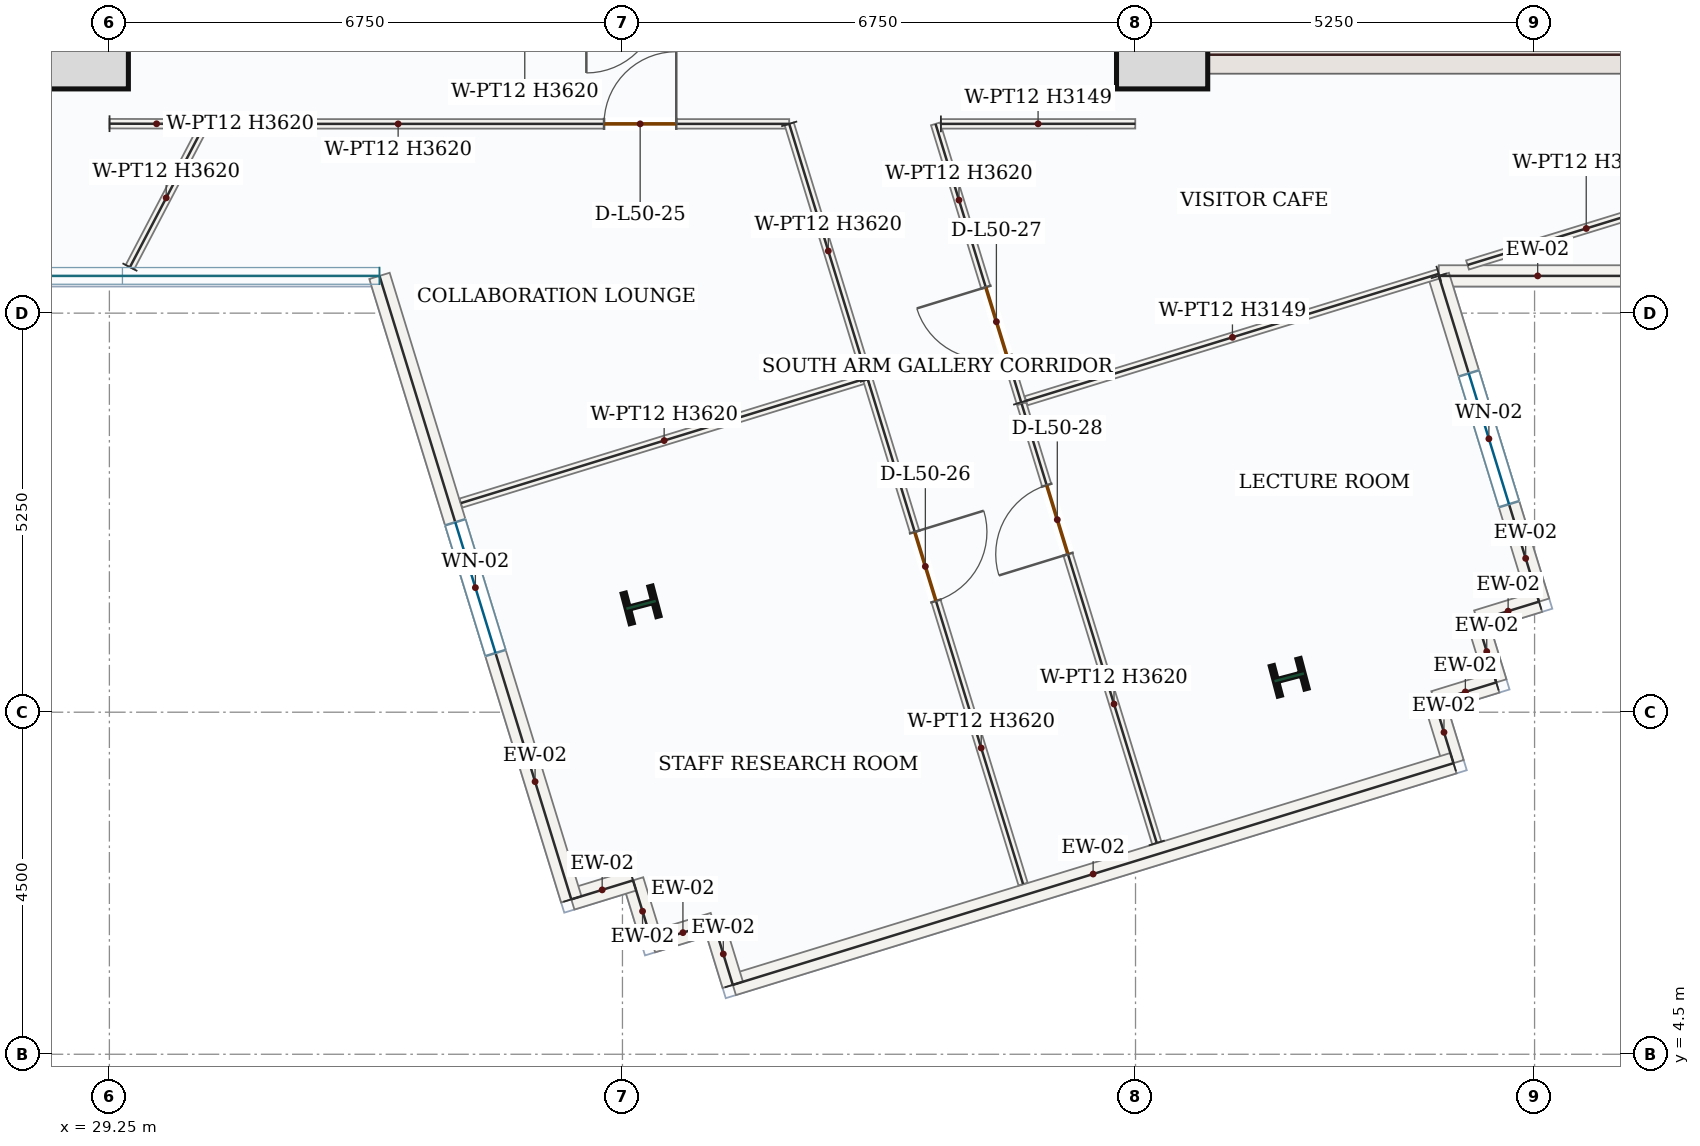
"""IFC4 building model, lengths in metres.
Left out: names, types, materials, properties, quantities, classifications, styles, units other than length and angle.
Written with IfcOpenShell. Run it as: python <this file> out.ifc"""

import sys

from ifc_helpers import new_model, si_unit, direction, frame, frame_2d, origin, origin_2d, place, context, subcontext, project, spatial, rectangle, i_section, extrude, source, transform, mapped, element, fill, save


model = new_model("IFC4")
c1 = context("Model", 3, precision=1e-05, world=origin(), true_north=direction((0.0, 1.0)))
c2 = subcontext(c1, "Body", "Model", "MODEL_VIEW")
j1 = project(units=[si_unit("LENGTHUNIT", "METRE"), si_unit("PLANEANGLEUNIT", "RADIAN")], contexts=[c1])
p1 = place(None, origin())
s1 = spatial("IfcSite", under=j1, at=p1, CompositionType="ELEMENT")
p2 = place(p1, origin())
s2 = spatial("IfcBuilding", under=s1, at=p2, CompositionType="ELEMENT")
p3 = place(p2, frame((0.0, 0.0, 213.6)))
s3 = spatial("IfcBuildingStorey", under=s2, at=p3, CompositionType="ELEMENT", Elevation=213.6)
p4 = place(p3, frame((29.0, 17.4, 0.0), z_axis=(0.0, 0.0, 1.0), x_axis=(0.0, 1.0, 0.0)))
e1 = element("IfcWall", 1, at=p4, inside=s3, PredefinedType="SHEAR", context=c2, shape_type="SweptSolid", body=[
    extrude(rectangle(XDim=8.55, YDim=0.5, at=frame_2d((4.275, 0.0))), origin(), (0.0, 0.0, 1.0), 3.62),
])
p5 = place(p4, frame((6.65, 0.0, 0.0)))
e2 = element("IfcOpeningElement", 2, at=p5, cuts=e1, PredefinedType="OPENING", context=c2, shape_type="SweptSolid", body=[
    extrude(rectangle(XDim=1.1, YDim=2.2, at=frame_2d((0.55, 1.1))), frame((0.0, 0.26, 0.0), z_axis=(0.0, -1.0, 0.0), x_axis=(1.0, 0.0, 0.0)), (0.0, 0.0, 1.0), 0.52),
])
p6 = place(p4, frame((3.15, 0.0, 0.0)))
e3 = element("IfcOpeningElement", 3, at=p6, cuts=e1, PredefinedType="OPENING", context=c2, shape_type="SweptSolid", body=[
    extrude(rectangle(XDim=0.88, YDim=2.1, at=frame_2d((0.44, 1.05))), frame((0.0, 0.26, 0.0), z_axis=(0.0, -1.0, 0.0), x_axis=(1.0, 0.0, 0.0)), (0.0, 0.0, 1.0), 0.52),
])
m1 = source(origin(), c2, "Body", "SweptSolid", [
    extrude(rectangle(XDim=7.0, YDim=0.5, at=frame_2d((3.5, 0.0))), origin(), (0.0, 0.0, 1.0), 3.62),
])
p7 = place(p3, frame((21.75, 17.65, 0.0), z_axis=(0.0, 0.0, 1.0), x_axis=(1.0, 0.0, 0.0)))
e4 = element("IfcWall", 4, at=p7, inside=s3, PredefinedType="SHEAR", context=c2, shape_type="MappedRepresentation", body=[
    mapped(m1, transform((0.0, 0.0, 0.0), x_axis=(1.0, 0.0, 0.0), y_axis=(0.0, 1.0, 0.0), z_axis=(0.0, 0.0, 1.0), scale=1.0)),
])
p8 = place(p3, frame((43.0, 17.4, 0.0), z_axis=(0.0, 0.0, 1.0), x_axis=(0.0, 1.0, 0.0)))
e5 = element("IfcWall", 5, at=p8, inside=s3, PredefinedType="SHEAR", context=c2, shape_type="SweptSolid", body=[
    extrude(rectangle(XDim=8.55, YDim=0.5, at=frame_2d((4.275, 0.0))), origin(), (0.0, 0.0, 1.0), 3.62),
])
p9 = place(p8, frame((6.65, 0.0, 0.0)))
e6 = element("IfcOpeningElement", 6, at=p9, cuts=e5, PredefinedType="OPENING", context=c2, shape_type="SweptSolid", body=[
    extrude(rectangle(XDim=1.1, YDim=2.2, at=frame_2d((0.55, 1.1))), frame((0.0, 0.26, 0.0), z_axis=(0.0, -1.0, 0.0), x_axis=(1.0, 0.0, 0.0)), (0.0, 0.0, 1.0), 0.52),
])
p10 = place(p8, frame((1.75, 0.0, 0.0)))
e7 = element("IfcOpeningElement", 7, at=p10, cuts=e5, PredefinedType="OPENING", context=c2, shape_type="SweptSolid", body=[
    extrude(rectangle(XDim=1.3, YDim=2.2, at=frame_2d((0.65, 1.1))), frame((0.0, 0.26, 0.0), z_axis=(0.0, -1.0, 0.0), x_axis=(1.0, 0.0, 0.0)), (0.0, 0.0, 1.0), 0.52),
])
p11 = place(p8, frame((4.55, 0.0, 0.0)))
e8 = element("IfcOpeningElement", 8, at=p11, cuts=e5, PredefinedType="OPENING", context=c2, shape_type="SweptSolid", body=[
    extrude(rectangle(XDim=0.88, YDim=2.1, at=frame_2d((0.44, 1.05))), frame((0.0, 0.26, 0.0), z_axis=(0.0, -1.0, 0.0), x_axis=(1.0, 0.0, 0.0)), (0.0, 0.0, 1.0), 0.52),
])
p12 = place(p3, frame((43.25, 17.65, 0.0), z_axis=(0.0, 0.0, 1.0), x_axis=(1.0, 0.0, 0.0)))
e9 = element("IfcWall", 9, at=p12, inside=s3, PredefinedType="SHEAR", context=c2, shape_type="MappedRepresentation", body=[
    mapped(m1, transform((0.0, 0.0, 0.0), x_axis=(1.0, 0.0, 0.0), y_axis=(0.0, 1.0, 0.0), z_axis=(0.0, 0.0, 1.0), scale=1.0)),
])
m2 = source(origin(), c2, "Body", "SweptSolid", [
    extrude(rectangle(XDim=1.2, YDim=1.2, at=origin_2d()), origin(), (0.0, 0.0, 1.0), 3.9),
])
for number, where, z_axis, x_axis in (
    (10, (28.9, 17.8, 0.0), (0.0, 0.0, 1.0), (1.0, 0.0, 0.0)),
    (11, (43.1, 17.8, 0.0), (0.0, 0.0, 1.0), (1.0, 0.0, 0.0)),
):
    element("IfcColumn", number, at=place(p3, frame(where, z_axis=z_axis, x_axis=x_axis)), inside=s3, PredefinedType="COLUMN", context=c2, shape_type="MappedRepresentation", body=[
        mapped(m2, transform((0.0, 0.0, 0.0), x_axis=(1.0, 0.0, 0.0), y_axis=(0.0, 1.0, 0.0), z_axis=(0.0, 0.0, 1.0), scale=1.0)),
    ])
m3 = source(origin(), c2, "Body", "SweptSolid", [
    extrude(i_section(OverallWidth=0.404, OverallDepth=0.407, WebThickness=0.027, FlangeThickness=0.044, FilletRadius=0.018, at=origin_2d()), origin(), (0.0, 0.0, 1.0), 3.9),
])
for number, where, z_axis, x_axis in (
    (12, (36.245, 10.412, 0.0), (0.0, 0.0, 1.0), (-0.255, 0.967, 0.0)),
    (13, (44.772, 9.459, 0.0), (0.0, 0.0, 1.0), (-0.255, 0.967, 0.0)),
):
    element("IfcColumn", number, at=place(p3, frame(where, z_axis=z_axis, x_axis=x_axis)), inside=s3, PredefinedType="COLUMN", context=c2, shape_type="MappedRepresentation", body=[
        mapped(m3, transform((0.0, 0.0, 0.0), x_axis=(1.0, 0.0, 0.0), y_axis=(0.0, 1.0, 0.0), z_axis=(0.0, 0.0, 1.0), scale=1.0)),
    ])
m4 = source(origin(), c2, "Body", "SweptSolid", [
    extrude(rectangle(XDim=2.602, YDim=0.28, at=frame_2d((1.301, 0.0))), origin(), (0.0, 0.0, 1.0), 3.62),
])
p13 = place(p3, frame((49.342, 14.74, 0.0), z_axis=(0.0, 0.0, 1.0), x_axis=(-1.0, 0.0, 0.0)))
e14 = element("IfcWall", 14, at=p13, inside=s3, PredefinedType="SOLIDWALL", context=c2, shape_type="MappedRepresentation", body=[
    mapped(m4, transform((0.0, 0.0, 0.0), x_axis=(1.0, 0.0, 0.0), y_axis=(0.0, 1.0, 0.0), z_axis=(0.0, 0.0, 1.0), scale=1.0)),
])
p14 = place(p3, frame((46.74, 14.74, 0.0), z_axis=(0.0, 0.0, 1.0), x_axis=(0.294009328951, -0.95580254995, 0.0)))
e15 = element("IfcWall", 15, at=p14, inside=s3, PredefinedType="SOLIDWALL", context=c2, shape_type="SweptSolid", body=[
    extrude(rectangle(XDim=4.484, YDim=0.28, at=frame_2d((2.242, 0.0))), origin(), (0.0, 0.0, 1.0), 3.62),
])
p15 = place(p14, frame((1.342, 0.0, 0.85)))
e16 = element("IfcOpeningElement", 16, at=p15, cuts=e15, PredefinedType="OPENING", context=c2, shape_type="SweptSolid", body=[
    extrude(rectangle(XDim=1.8, YDim=1.75, at=frame_2d((0.9, 0.875))), frame((0.0, 0.15, 0.0), z_axis=(0.0, -1.0, 0.0), x_axis=(1.0, 0.0, 0.0)), (0.0, 0.0, 1.0), 0.3),
])
m5 = source(origin(), c2, "Body", "SweptSolid", [
    extrude(rectangle(XDim=0.85, YDim=0.28, at=frame_2d((0.425, 0.0))), origin(), (0.0, 0.0, 1.0), 3.62),
])
p16 = place(p3, frame((48.058, 10.454, 0.0), z_axis=(0.0, 0.0, 1.0), x_axis=(-0.955834897765, -0.293904148005, 0.0)))
e17 = element("IfcWall", 17, at=p16, inside=s3, PredefinedType="SOLIDWALL", context=c2, shape_type="MappedRepresentation", body=[
    mapped(m5, transform((0.0, 0.0, 0.0), x_axis=(1.0, 0.0, 0.0), y_axis=(0.0, 1.0, 0.0), z_axis=(0.0, 0.0, 1.0), scale=1.0)),
])
m6 = source(origin(), c2, "Body", "SweptSolid", [
    extrude(rectangle(XDim=0.85, YDim=0.28, at=frame_2d((0.425, 0.0))), origin(), (0.0, 0.0, 1.0), 3.62),
])
p17 = place(p3, frame((47.246, 10.204, 0.0), z_axis=(0.0, 0.0, 1.0), x_axis=(0.293823460726, -0.955859704102, 0.0)))
e18 = element("IfcWall", 18, at=p17, inside=s3, PredefinedType="SOLIDWALL", context=c2, shape_type="MappedRepresentation", body=[
    mapped(m6, transform((0.0, 0.0, 0.0), x_axis=(1.0, 0.0, 0.0), y_axis=(0.0, 1.0, 0.0), z_axis=(0.0, 0.0, 1.0), scale=1.0)),
])
p18 = place(p3, frame((47.496, 9.392, 0.0), z_axis=(0.0, 0.0, 1.0), x_axis=(-0.95575416016, -0.294166594531, 0.0)))
e19 = element("IfcWall", 19, at=p18, inside=s3, PredefinedType="SOLIDWALL", context=c2, shape_type="MappedRepresentation", body=[
    mapped(m5, transform((0.0, 0.0, 0.0), x_axis=(1.0, 0.0, 0.0), y_axis=(0.0, 1.0, 0.0), z_axis=(0.0, 0.0, 1.0), scale=1.0)),
])
p19 = place(p3, frame((46.683, 9.142, 0.0), z_axis=(0.0, 0.0, 1.0), x_axis=(0.293823460726, -0.955859704102, 0.0)))
e20 = element("IfcWall", 20, at=p19, inside=s3, PredefinedType="SOLIDWALL", context=c2, shape_type="MappedRepresentation", body=[
    mapped(m6, transform((0.0, 0.0, 0.0), x_axis=(1.0, 0.0, 0.0), y_axis=(0.0, 1.0, 0.0), z_axis=(0.0, 0.0, 1.0), scale=1.0)),
])
m7 = source(origin(), c2, "Body", "SweptSolid", [
    extrude(rectangle(XDim=9.92, YDim=0.28, at=frame_2d((4.96, 0.0))), origin(), (0.0, 0.0, 1.0), 3.62),
])
p20 = place(p3, frame((46.933, 8.329, 0.0), z_axis=(0.0, 0.0, 1.0), x_axis=(-0.955796567368, -0.294028777175, 0.0)))
e21 = element("IfcWall", 21, at=p20, inside=s3, PredefinedType="SOLIDWALL", context=c2, shape_type="MappedRepresentation", body=[
    mapped(m7, transform((0.0, 0.0, 0.0), x_axis=(1.0, 0.0, 0.0), y_axis=(0.0, 1.0, 0.0), z_axis=(0.0, 0.0, 1.0), scale=1.0)),
])
for number, where, z_axis, x_axis in (
    (22, (37.452, 5.413, 0.0), (0.0, 0.0, 1.0), (-0.294, 0.956, 0.0)),
    (23, (37.202, 6.225, 0.0), (0.0, 0.0, 1.0), (-0.956, -0.294, 0.0)),
    (24, (36.389, 5.975, 0.0), (0.0, 0.0, 1.0), (-0.294, 0.956, 0.0)),
    (25, (36.139, 6.788, 0.0), (0.0, 0.0, 1.0), (-0.956, -0.294, 0.0)),
):
    element("IfcWall", number, at=place(p3, frame(where, z_axis=z_axis, x_axis=x_axis)), inside=s3, PredefinedType="SOLIDWALL", context=c2, shape_type="MappedRepresentation", body=[
        mapped(m6, transform((0.0, 0.0, 0.0), x_axis=(1.0, 0.0, 0.0), y_axis=(0.0, 1.0, 0.0), z_axis=(0.0, 0.0, 1.0), scale=1.0)),
    ])
p21 = place(p3, frame((35.327, 6.538, 0.0), z_axis=(0.0, 0.0, 1.0), x_axis=(-0.294019877333, 0.955799305154, 0.0)))
e26 = element("IfcWall", 26, at=p21, inside=s3, PredefinedType="SOLIDWALL", context=c2, shape_type="SweptSolid", body=[
    extrude(rectangle(XDim=8.582, YDim=0.28, at=frame_2d((4.291, 0.0))), origin(), (0.0, 0.0, 1.0), 3.62),
])
p22 = place(p21, frame((3.391, 0.0, 0.85)))
e27 = element("IfcOpeningElement", 27, at=p22, cuts=e26, PredefinedType="OPENING", context=c2, shape_type="SweptSolid", body=[
    extrude(rectangle(XDim=1.8, YDim=1.75, at=frame_2d((0.9, 0.875))), frame((0.0, 0.15, 0.0), z_axis=(0.0, -1.0, 0.0), x_axis=(1.0, 0.0, 0.0)), (0.0, 0.0, 1.0), 0.3),
])
p23 = place(p3, frame((41.246, 13.077, 0.0), z_axis=(0.0, 0.0, 1.0), x_axis=(-0.294050037582, 0.955790026836, 0.0)))
e28 = element("IfcWall", 28, at=p23, inside=s3, PredefinedType="PARTITIONING", context=c2, shape_type="SweptSolid", body=[
    extrude(rectangle(XDim=3.833, YDim=0.125, at=frame_2d((1.916, 0.0))), origin(), (0.0, 0.0, 1.0), 3.62),
])
p24 = place(p23, frame((0.634, 0.0, 0.0)))
e29 = element("IfcOpeningElement", 29, at=p24, cuts=e28, PredefinedType="OPENING", context=c2, shape_type="SweptSolid", body=[
    extrude(rectangle(XDim=0.95, YDim=2.15, at=frame_2d((0.475, 1.075))), frame((0.0, 0.073, 0.0), z_axis=(0.0, -1.0, 0.0), x_axis=(1.0, 0.0, 0.0)), (0.0, 0.0, 1.0), 0.145),
])
m8 = source(origin(), c2, "Body", "SweptSolid", [
    extrude(rectangle(XDim=2.557, YDim=0.125, at=frame_2d((1.278, 0.0))), origin(), (0.0, 0.0, 1.0), 3.149),
])
p25 = place(p3, frame((40.19, 16.74, 0.0), z_axis=(0.0, 0.0, 1.0), x_axis=(0.999999886036, 0.000477418068, 0.0)))
e30 = element("IfcWall", 30, at=p25, inside=s3, PredefinedType="PARTITIONING", context=c2, shape_type="MappedRepresentation", body=[
    mapped(m8, transform((0.0, 0.0, 0.0), x_axis=(1.0, 0.0, 0.0), y_axis=(0.0, 1.0, 0.0), z_axis=(0.0, 0.0, 1.0), scale=1.0)),
])
m9 = source(origin(), c2, "Body", "SweptSolid", [
    extrude(rectangle(XDim=3.268, YDim=0.125, at=frame_2d((1.634, 0.0))), origin(), (0.0, 0.0, 1.0), 3.62),
])
p26 = place(p3, frame((50.241, 15.844, 0.0), z_axis=(0.0, 0.0, 1.0), x_axis=(-0.955791929964, -0.294043851519, 0.0)))
e31 = element("IfcWall", 31, at=p26, inside=s3, PredefinedType="PARTITIONING", context=c2, shape_type="MappedRepresentation", body=[
    mapped(m9, transform((0.0, 0.0, 0.0), x_axis=(1.0, 0.0, 0.0), y_axis=(0.0, 1.0, 0.0), z_axis=(0.0, 0.0, 1.0), scale=1.0)),
])
m10 = source(origin(), c2, "Body", "SweptSolid", [
    extrude(rectangle(XDim=5.68, YDim=0.125, at=frame_2d((2.84, 0.0))), origin(), (0.0, 0.0, 1.0), 3.149),
])
p27 = place(p3, frame((46.74, 14.767, 0.0), z_axis=(0.0, 0.0, 1.0), x_axis=(-0.955800379324, -0.294016385402, 0.0)))
e32 = element("IfcWall", 32, at=p27, inside=s3, PredefinedType="PARTITIONING", context=c2, shape_type="MappedRepresentation", body=[
    mapped(m10, transform((0.0, 0.0, 0.0), x_axis=(1.0, 0.0, 0.0), y_axis=(0.0, 1.0, 0.0), z_axis=(0.0, 0.0, 1.0), scale=1.0)),
])
p28 = place(p3, frame((30.49, 16.74, 0.0), z_axis=(0.0, 0.0, 1.0), x_axis=(1.0, 0.0, 0.0)))
e33 = element("IfcWall", 33, at=p28, inside=s3, PredefinedType="PARTITIONING", context=c2, shape_type="SweptSolid", body=[
    extrude(rectangle(XDim=7.704, YDim=0.125, at=frame_2d((3.852, 0.0))), origin(), (0.0, 0.0, 1.0), 3.62),
])
p29 = place(p28, frame((5.268, 0.0, 0.0)))
e34 = element("IfcOpeningElement", 34, at=p29, cuts=e33, PredefinedType="OPENING", context=c2, shape_type="SweptSolid", body=[
    extrude(rectangle(XDim=0.95, YDim=2.15, at=frame_2d((0.475, 1.075))), frame((0.0, 0.073, 0.0), z_axis=(0.0, -1.0, 0.0), x_axis=(1.0, 0.0, 0.0)), (0.0, 0.0, 1.0), 0.145),
])
m11 = source(origin(), c2, "Body", "SweptSolid", [
    extrude(rectangle(XDim=3.498, YDim=0.125, at=frame_2d((1.749, 0.0))), origin(), (0.0, 0.0, 1.0), 3.62),
])
p30 = place(p3, frame((38.194, 16.74, 0.0), z_axis=(0.0, 0.0, 1.0), x_axis=(0.294012288782, -0.955801639487, 0.0)))
e35 = element("IfcWall", 35, at=p30, inside=s3, PredefinedType="PARTITIONING", context=c2, shape_type="MappedRepresentation", body=[
    mapped(m11, transform((0.0, 0.0, 0.0), x_axis=(1.0, 0.0, 0.0), y_axis=(0.0, 1.0, 0.0), z_axis=(0.0, 0.0, 1.0), scale=1.0)),
])
m12 = source(origin(), c2, "Body", "SweptSolid", [
    extrude(rectangle(XDim=5.595, YDim=0.125, at=frame_2d((2.797, 0.0))), origin(), (0.0, 0.0, 1.0), 3.62),
])
p31 = place(p3, frame((39.222, 13.396, 0.0), z_axis=(0.0, 0.0, 1.0), x_axis=(-0.955787499516, -0.294058252339, 0.0)))
e36 = element("IfcWall", 36, at=p31, inside=s3, PredefinedType="PARTITIONING", context=c2, shape_type="MappedRepresentation", body=[
    mapped(m12, transform((0.0, 0.0, 0.0), x_axis=(1.0, 0.0, 0.0), y_axis=(0.0, 1.0, 0.0), z_axis=(0.0, 0.0, 1.0), scale=1.0)),
])
m13 = source(origin(), c2, "Body", "SweptSolid", [
    extrude(rectangle(XDim=2.058, YDim=0.125, at=frame_2d((1.029, 0.0))), origin(), (0.0, 0.0, 1.0), 3.62),
])
p32 = place(p3, frame((29.52, 14.855, 0.0), z_axis=(0.0, 0.0, 1.0), x_axis=(0.463745427916, 0.885968497232, 0.0)))
e37 = element("IfcWall", 37, at=p32, inside=s3, PredefinedType="PARTITIONING", context=c2, shape_type="MappedRepresentation", body=[
    mapped(m13, transform((0.0, 0.0, 0.0), x_axis=(1.0, 0.0, 0.0), y_axis=(0.0, 1.0, 0.0), z_axis=(0.0, 0.0, 1.0), scale=1.0)),
])
p33 = place(p3, frame((43.029, 7.28, 0.0), z_axis=(0.0, 0.0, 1.0), x_axis=(-0.294054630952, 0.955788613667, 0.0)))
e38 = element("IfcWall", 38, at=p33, inside=s3, PredefinedType="PARTITIONING", context=c2, shape_type="SweptSolid", body=[
    extrude(rectangle(XDim=6.045, YDim=0.125, at=frame_2d((3.022, 0.0))), origin(), (0.0, 0.0, 1.0), 3.62),
])
p34 = place(p33, frame((3.974, 0.0, 0.0)))
e39 = element("IfcOpeningElement", 39, at=p34, cuts=e38, PredefinedType="OPENING", context=c2, shape_type="SweptSolid", body=[
    extrude(rectangle(XDim=0.95, YDim=2.15, at=frame_2d((0.475, 1.075))), frame((0.0, 0.073, 0.0), z_axis=(0.0, -1.0, 0.0), x_axis=(1.0, 0.0, 0.0)), (0.0, 0.0, 1.0), 0.145),
])
p35 = place(p3, frame((39.229, 13.377, 0.0), z_axis=(0.0, 0.0, 1.0), x_axis=(0.294016682873, -0.955800287818, 0.0)))
e40 = element("IfcWall", 40, at=p35, inside=s3, PredefinedType="PARTITIONING", context=c2, shape_type="SweptSolid", body=[
    extrude(rectangle(XDim=6.945, YDim=0.125, at=frame_2d((3.473, 0.0))), origin(), (0.0, 0.0, 1.0), 3.62),
])
p36 = place(p35, frame((2.098, 0.0, 0.0)))
e41 = element("IfcOpeningElement", 41, at=p36, cuts=e40, PredefinedType="OPENING", context=c2, shape_type="SweptSolid", body=[
    extrude(rectangle(XDim=0.95, YDim=2.15, at=frame_2d((0.475, 1.075))), frame((0.0, 0.073, 0.0), z_axis=(0.0, -1.0, 0.0), x_axis=(1.0, 0.0, 0.0)), (0.0, 0.0, 1.0), 0.145),
])
m14 = source(origin(), c2, "Body", "SweptSolid", [
    extrude(rectangle(XDim=1.238, YDim=0.125, at=frame_2d((0.619, 0.0))), origin(), (0.0, 0.0, 1.0), 3.62),
])
p37 = place(p3, frame((29.252, 16.743, 0.0), z_axis=(0.0, 0.0, 1.0), x_axis=(0.9999976473, -0.002169192293, 0.0)))
e42 = element("IfcWall", 42, at=p37, inside=s3, PredefinedType="PARTITIONING", context=c2, shape_type="MappedRepresentation", body=[
    mapped(m14, transform((0.0, 0.0, 0.0), x_axis=(1.0, 0.0, 0.0), y_axis=(0.0, 1.0, 0.0), z_axis=(0.0, 0.0, 1.0), scale=1.0)),
])
m15 = source(origin(), c2, "Body", "SweptSolid", [
    extrude(rectangle(XDim=1.8, YDim=1.75, at=frame_2d((0.9, 0.875))), frame((0.0, 0.03, 0.0), z_axis=(0.0, -1.0, 0.0), x_axis=(1.0, 0.0, 0.0)), (0.0, 0.0, 1.0), 0.06),
])
p38 = place(p15, origin())
e43 = element("IfcWindow", 43, at=p38, inside=s3, PartitioningType="DOUBLE_PANEL_VERTICAL", PredefinedType="WINDOW", context=c2, shape_type="MappedRepresentation", body=[
    mapped(m15, transform((0.0, 0.0, 0.0), x_axis=(1.0, 0.0, 0.0), y_axis=(0.0, 1.0, 0.0), z_axis=(0.0, 0.0, 1.0), scale=1.0)),
])
fill(e16, e43)
p39 = place(p22, origin())
e44 = element("IfcWindow", 44, at=p39, inside=s3, PartitioningType="DOUBLE_PANEL_VERTICAL", PredefinedType="WINDOW", context=c2, shape_type="MappedRepresentation", body=[
    mapped(m15, transform((0.0, 0.0, 0.0), x_axis=(1.0, 0.0, 0.0), y_axis=(0.0, 1.0, 0.0), z_axis=(0.0, 0.0, 1.0), scale=1.0)),
])
fill(e27, e44)
m16 = source(origin(), c2, "Body", "SweptSolid", [
    extrude(rectangle(XDim=0.95, YDim=2.15, at=frame_2d((0.475, 1.075))), frame((0.0, 0.025, 0.0), z_axis=(0.0, -1.0, 0.0), x_axis=(1.0, 0.0, 0.0)), (0.0, 0.0, 1.0), 0.05),
])
p40 = place(p29, origin())
e45 = element("IfcDoor", 45, at=p40, inside=s3, OperationType="SINGLE_SWING_RIGHT", PredefinedType="DOOR", context=c2, shape_type="MappedRepresentation", body=[
    mapped(m16, transform((0.0, 0.0, 0.0), x_axis=(1.0, 0.0, 0.0), y_axis=(0.0, 1.0, 0.0), z_axis=(0.0, 0.0, 1.0), scale=1.0)),
])
fill(e34, e45)
p41 = place(p36, origin())
e46 = element("IfcDoor", 46, at=p41, inside=s3, OperationType="SINGLE_SWING_LEFT", PredefinedType="DOOR", context=c2, shape_type="MappedRepresentation", body=[
    mapped(m16, transform((0.0, 0.0, 0.0), x_axis=(1.0, 0.0, 0.0), y_axis=(0.0, 1.0, 0.0), z_axis=(0.0, 0.0, 1.0), scale=1.0)),
])
fill(e41, e46)
p42 = place(p24, origin())
e47 = element("IfcDoor", 47, at=p42, inside=s3, OperationType="SINGLE_SWING_RIGHT", PredefinedType="DOOR", context=c2, shape_type="MappedRepresentation", body=[
    mapped(m16, transform((0.0, 0.0, 0.0), x_axis=(1.0, 0.0, 0.0), y_axis=(0.0, 1.0, 0.0), z_axis=(0.0, 0.0, 1.0), scale=1.0)),
])
fill(e29, e47)
p43 = place(p34, origin())
e48 = element("IfcDoor", 48, at=p43, inside=s3, OperationType="SINGLE_SWING_LEFT", PredefinedType="DOOR", context=c2, shape_type="MappedRepresentation", body=[
    mapped(m16, transform((0.0, 0.0, 0.0), x_axis=(1.0, 0.0, 0.0), y_axis=(0.0, 1.0, 0.0), z_axis=(0.0, 0.0, 1.0), scale=1.0)),
])
fill(e39, e48)
save(model, sys.argv[1])
